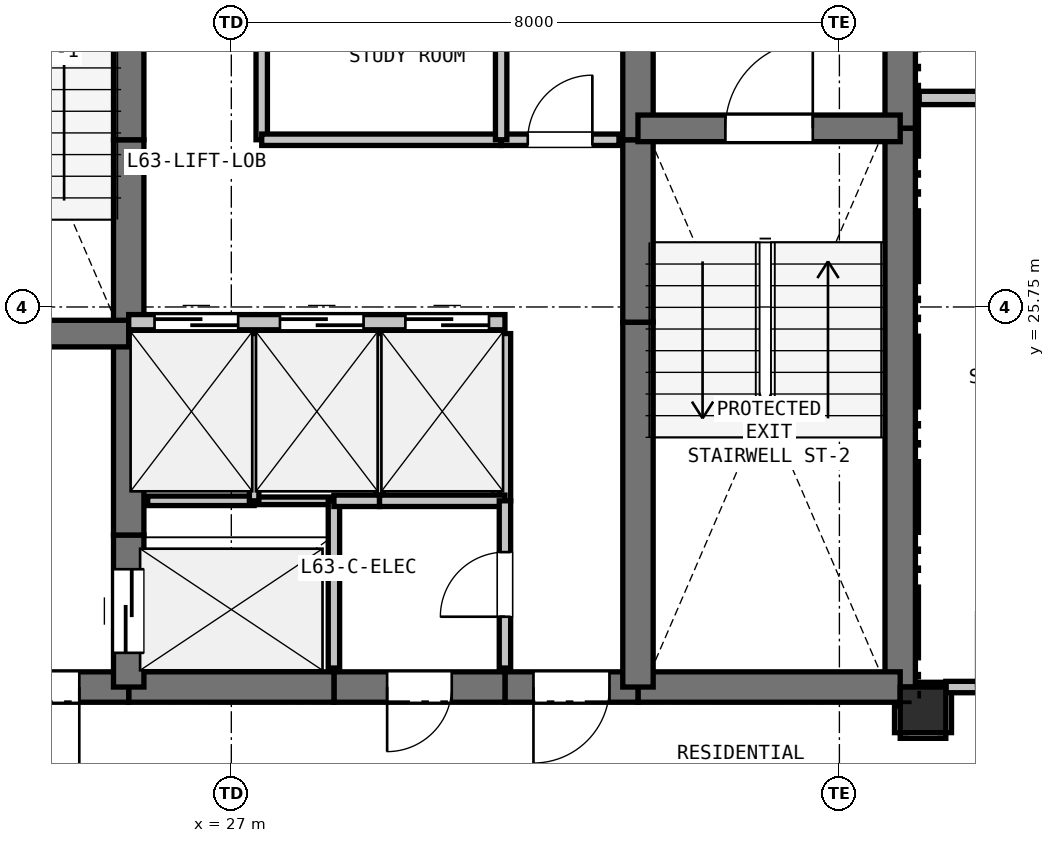
"""IFC4 building model, lengths in metres.
Left out: names, types, materials, properties, quantities, classifications, styles, units other than length and angle.
Written with IfcOpenShell. Run it as: python <this file> out.ifc"""

import sys

from ifc_helpers import new_model, si_unit, direction, frame, frame_2d, origin, origin_2d, place, context, subcontext, project, spatial, rectangle, extrude, element, fill, save


model = new_model("IFC4")
c1 = context("Model", 3, precision=1e-05, world=origin(), true_north=direction((0.0, 1.0)))
c2 = subcontext(c1, "Body", "Model", "MODEL_VIEW")
j1 = project(units=[si_unit("LENGTHUNIT", "METRE"), si_unit("PLANEANGLEUNIT", "RADIAN")], contexts=[c1])
p1 = place(None, origin())
s1 = spatial("IfcSite", under=j1, at=p1, CompositionType="ELEMENT")
p2 = place(p1, origin())
s2 = spatial("IfcBuilding", under=s1, at=p2, CompositionType="ELEMENT")
p3 = place(p2, frame((0.0, 0.0, 226.5)))
s3 = spatial("IfcBuildingStorey", under=s2, at=p3, CompositionType="ELEMENT", Elevation=226.5)
p4 = place(p3, frame((36.1, 20.45, 0.0), z_axis=(0.0, 0.0, 1.0), x_axis=(1.0, 0.0, 0.0)))
e1 = element("IfcColumn", 1, at=p4, inside=s3, PredefinedType="COLUMN", context=c2, shape_type="SweptSolid", body=[
    extrude(rectangle(XDim=0.6, YDim=0.6, at=origin_2d()), origin(), (0.0, 0.0, 1.0), 3.3),
])
p5 = place(p3, frame((35.8, 32.75, 0.0), z_axis=(0.0, 0.0, 1.0), x_axis=(0.0, -1.0, 0.0)))
e2 = element("IfcWall", 2, at=p5, inside=s3, PredefinedType="SHEAR", context=c2, shape_type="SweptSolid", body=[
    extrude(rectangle(XDim=4.65, YDim=0.4, at=frame_2d((2.325, 0.0))), origin(), (0.0, 0.0, 1.0), 3.08),
])
p6 = place(p3, frame((35.8, 28.1, 0.0), z_axis=(0.0, 0.0, 1.0), x_axis=(0.0, -1.0, 0.0)))
e3 = element("IfcWall", 3, at=p6, inside=s3, PredefinedType="SHEAR", context=c2, shape_type="SweptSolid", body=[
    extrude(rectangle(XDim=7.35, YDim=0.4, at=frame_2d((3.675, 0.0))), origin(), (0.0, 0.0, 1.0), 3.08),
])
p7 = place(p3, frame((35.8, 20.75, 0.0), z_axis=(0.0, 0.0, 1.0), x_axis=(-1.0, 0.0, 0.0)))
e4 = element("IfcWall", 4, at=p7, inside=s3, PredefinedType="SHEAR", context=c2, shape_type="SweptSolid", body=[
    extrude(rectangle(XDim=3.45, YDim=0.4, at=frame_2d((1.725, 0.0))), origin(), (0.0, 0.0, 1.0), 3.08),
])
p8 = place(p3, frame((32.35, 20.75, 0.0), z_axis=(0.0, 0.0, 1.0), x_axis=(-1.0, 0.0, 0.0)))
e5 = element("IfcWall", 5, at=p8, inside=s3, PredefinedType="SHEAR", context=c2, shape_type="SweptSolid", body=[
    extrude(rectangle(XDim=1.75, YDim=0.4, at=frame_2d((0.875, 0.0))), origin(), (0.0, 0.0, 1.0), 3.08),
])
p9 = place(p8, frame((0.375, 0.0, 0.0)))
e6 = element("IfcOpeningElement", 6, at=p9, cuts=e5, PredefinedType="OPENING", context=c2, shape_type="SweptSolid", body=[
    extrude(rectangle(XDim=1.0, YDim=2.15, at=frame_2d((0.5, 1.075))), frame((0.0, 0.21, 0.0), z_axis=(0.0, -1.0, 0.0), x_axis=(1.0, 0.0, 0.0)), (0.0, 0.0, 1.0), 0.42),
])
p10 = place(p3, frame((30.6, 20.75, 0.0), z_axis=(0.0, 0.0, 1.0), x_axis=(-1.0, 0.0, 0.0)))
e7 = element("IfcWall", 7, at=p10, inside=s3, PredefinedType="SHEAR", context=c2, shape_type="SweptSolid", body=[
    extrude(rectangle(XDim=2.25, YDim=0.4, at=frame_2d((1.125, 0.0))), origin(), (0.0, 0.0, 1.0), 3.08),
])
p11 = place(p10, frame((0.7, 0.0, 0.0)))
e8 = element("IfcOpeningElement", 8, at=p11, cuts=e7, PredefinedType="OPENING", context=c2, shape_type="SweptSolid", body=[
    extrude(rectangle(XDim=0.85, YDim=2.1, at=frame_2d((0.425, 1.05))), frame((0.0, 0.21, 0.0), z_axis=(0.0, -1.0, 0.0), x_axis=(1.0, 0.0, 0.0)), (0.0, 0.0, 1.0), 0.42),
])
p12 = place(p3, frame((28.35, 20.75, 0.0), z_axis=(0.0, 0.0, 1.0), x_axis=(-1.0, 0.0, 0.0)))
e9 = element("IfcWall", 9, at=p12, inside=s3, PredefinedType="SHEAR", context=c2, shape_type="SweptSolid", body=[
    extrude(rectangle(XDim=2.7, YDim=0.4, at=frame_2d((1.35, 0.0))), origin(), (0.0, 0.0, 1.0), 3.08),
])
p13 = place(p3, frame((25.65, 20.75, 0.0), z_axis=(0.0, 0.0, 1.0), x_axis=(-1.0, 0.0, 0.0)))
e10 = element("IfcWall", 10, at=p13, inside=s3, PredefinedType="SHEAR", context=c2, shape_type="SweptSolid", body=[
    extrude(rectangle(XDim=3.45, YDim=0.4, at=frame_2d((1.725, 0.0))), origin(), (0.0, 0.0, 1.0), 3.08),
])
p14 = place(p13, frame((0.65, 0.0, 0.0)))
e11 = element("IfcOpeningElement", 11, at=p14, cuts=e10, PredefinedType="OPENING", context=c2, shape_type="SweptSolid", body=[
    extrude(rectangle(XDim=1.15, YDim=2.15, at=frame_2d((0.575, 1.075))), frame((0.0, 0.21, 0.0), z_axis=(0.0, -1.0, 0.0), x_axis=(1.0, 0.0, 0.0)), (0.0, 0.0, 1.0), 0.42),
])
p15 = place(p3, frame((25.65, 20.75, 0.0), z_axis=(0.0, 0.0, 1.0), x_axis=(0.0, 1.0, 0.0)))
e12 = element("IfcWall", 12, at=p15, inside=s3, PredefinedType="SHEAR", context=c2, shape_type="SweptSolid", body=[
    extrude(rectangle(XDim=2.0, YDim=0.4, at=frame_2d((1.0, 0.0))), origin(), (0.0, 0.0, 1.0), 3.08),
])
p16 = place(p15, frame((0.45, 0.0, 0.0)))
e13 = element("IfcOpeningElement", 13, at=p16, cuts=e12, PredefinedType="OPENING", context=c2, shape_type="SweptSolid", body=[
    extrude(rectangle(XDim=1.1, YDim=2.15, at=frame_2d((0.55, 1.075))), frame((0.0, 0.21, 0.0), z_axis=(0.0, -1.0, 0.0), x_axis=(1.0, 0.0, 0.0)), (0.0, 0.0, 1.0), 0.42),
])
p17 = place(p3, frame((25.65, 22.75, 0.0), z_axis=(0.0, 0.0, 1.0), x_axis=(0.0, 1.0, 0.0)))
e14 = element("IfcWall", 14, at=p17, inside=s3, PredefinedType="SHEAR", context=c2, shape_type="SweptSolid", body=[
    extrude(rectangle(XDim=2.8, YDim=0.4, at=frame_2d((1.4, 0.0))), origin(), (0.0, 0.0, 1.0), 3.08),
])
p18 = place(p3, frame((25.65, 25.55, 0.0), z_axis=(0.0, 0.0, 1.0), x_axis=(0.0, 1.0, 0.0)))
e15 = element("IfcWall", 15, at=p18, inside=s3, PredefinedType="SHEAR", context=c2, shape_type="SweptSolid", body=[
    extrude(rectangle(XDim=2.4, YDim=0.4, at=frame_2d((1.2, 0.0))), origin(), (0.0, 0.0, 1.0), 3.08),
])
for number, where, z_axis, x_axis in (
    (16, (25.65, 27.95, 0.0), (0.0, 0.0, 1.0), (0.0, 1.0, 0.0)),
    (17, (32.35, 20.75, 0.0), (0.0, 0.0, 1.0), (0.0, 1.0, 0.0)),
):
    element("IfcWall", number, at=place(p3, frame(where, z_axis=z_axis, x_axis=x_axis)), inside=s3, PredefinedType="SHEAR", context=c2, shape_type="SweptSolid", body=[
        extrude(rectangle(XDim=4.8, YDim=0.4, at=frame_2d((2.4, 0.0))), origin(), (0.0, 0.0, 1.0), 3.08),
    ])
p19 = place(p3, frame((32.35, 25.55, 0.0), z_axis=(0.0, 0.0, 1.0), x_axis=(0.0, 1.0, 0.0)))
e18 = element("IfcWall", 18, at=p19, inside=s3, PredefinedType="SHEAR", context=c2, shape_type="SweptSolid", body=[
    extrude(rectangle(XDim=2.4, YDim=0.4, at=frame_2d((1.2, 0.0))), origin(), (0.0, 0.0, 1.0), 3.08),
])
p20 = place(p3, frame((32.35, 27.95, 0.0), z_axis=(0.0, 0.0, 1.0), x_axis=(0.0, 1.0, 0.0)))
e19 = element("IfcWall", 19, at=p20, inside=s3, PredefinedType="SHEAR", context=c2, shape_type="SweptSolid", body=[
    extrude(rectangle(XDim=2.8, YDim=0.4, at=frame_2d((1.4, 0.0))), origin(), (0.0, 0.0, 1.0), 3.08),
])
p21 = place(p3, frame((22.2, 25.4, 0.0), z_axis=(0.0, 0.0, 1.0), x_axis=(1.0, 0.0, 0.0)))
e20 = element("IfcWall", 20, at=p21, inside=s3, PredefinedType="SHEAR", context=c2, shape_type="SweptSolid", body=[
    extrude(rectangle(XDim=3.45, YDim=0.35, at=frame_2d((1.725, 0.0))), origin(), (0.0, 0.0, 1.0), 3.08),
])
p22 = place(p21, frame((1.15, 0.0, 0.0)))
e21 = element("IfcOpeningElement", 21, at=p22, cuts=e20, PredefinedType="OPENING", context=c2, shape_type="SweptSolid", body=[
    extrude(rectangle(XDim=1.15, YDim=2.15, at=frame_2d((0.575, 1.075))), frame((0.0, 0.185, 0.0), z_axis=(0.0, -1.0, 0.0), x_axis=(1.0, 0.0, 0.0)), (0.0, 0.0, 1.0), 0.37),
])
p23 = place(p3, frame((32.35, 28.1, 0.0), z_axis=(0.0, 0.0, 1.0), x_axis=(1.0, 0.0, 0.0)))
e22 = element("IfcWall", 22, at=p23, inside=s3, PredefinedType="SHEAR", context=c2, shape_type="SweptSolid", body=[
    extrude(rectangle(XDim=3.45, YDim=0.35, at=frame_2d((1.725, 0.0))), origin(), (0.0, 0.0, 1.0), 3.08),
])
p24 = place(p23, frame((1.15, 0.0, 0.0)))
e23 = element("IfcOpeningElement", 23, at=p24, cuts=e22, PredefinedType="OPENING", context=c2, shape_type="SweptSolid", body=[
    extrude(rectangle(XDim=1.15, YDim=2.15, at=frame_2d((0.575, 1.075))), frame((0.0, 0.185, 0.0), z_axis=(0.0, -1.0, 0.0), x_axis=(1.0, 0.0, 0.0)), (0.0, 0.0, 1.0), 0.37),
])
p25 = place(p3, frame((25.65, 25.55, 0.0), z_axis=(0.0, 0.0, 1.0), x_axis=(1.0, 0.0, 0.0)))
e24 = element("IfcWall", 24, at=p25, inside=s3, PredefinedType="PARTITIONING", context=c2, shape_type="SweptSolid", body=[
    extrude(rectangle(XDim=4.95, YDim=0.2, at=frame_2d((2.475, 0.0))), origin(), (0.0, 0.0, 1.0), 3.08),
])
p26 = place(p25, frame((0.34, 0.0, 0.0)))
e25 = element("IfcOpeningElement", 25, at=p26, cuts=e24, PredefinedType="OPENING", context=c2, shape_type="SweptSolid", body=[
    extrude(rectangle(XDim=1.1, YDim=2.15, at=frame_2d((0.55, 1.075))), frame((0.0, 0.11, 0.0), z_axis=(0.0, -1.0, 0.0), x_axis=(1.0, 0.0, 0.0)), (0.0, 0.0, 1.0), 0.22),
])
p27 = place(p25, frame((1.99, 0.0, 0.0)))
e26 = element("IfcOpeningElement", 26, at=p27, cuts=e24, PredefinedType="OPENING", context=c2, shape_type="SweptSolid", body=[
    extrude(rectangle(XDim=1.1, YDim=2.15, at=frame_2d((0.55, 1.075))), frame((0.0, 0.11, 0.0), z_axis=(0.0, -1.0, 0.0), x_axis=(1.0, 0.0, 0.0)), (0.0, 0.0, 1.0), 0.22),
])
p28 = place(p25, frame((3.64, 0.0, 0.0)))
e27 = element("IfcOpeningElement", 27, at=p28, cuts=e24, PredefinedType="OPENING", context=c2, shape_type="SweptSolid", body=[
    extrude(rectangle(XDim=1.1, YDim=2.15, at=frame_2d((0.55, 1.075))), frame((0.0, 0.11, 0.0), z_axis=(0.0, -1.0, 0.0), x_axis=(1.0, 0.0, 0.0)), (0.0, 0.0, 1.0), 0.22),
])
p29 = place(p3, frame((25.9, 23.2, 0.0), z_axis=(0.0, 0.0, 1.0), x_axis=(1.0, 0.0, 0.0)))
e28 = element("IfcWall", 28, at=p29, inside=s3, PredefinedType="PARTITIONING", context=c2, shape_type="SweptSolid", body=[
    extrude(rectangle(XDim=1.4, YDim=0.125, at=frame_2d((0.7, 0.0))), origin(), (0.0, 0.0, 1.0), 3.08),
])
p30 = place(p3, frame((27.3, 23.2, 0.0), z_axis=(0.0, 0.0, 1.0), x_axis=(1.0, 0.0, 0.0)))
e29 = element("IfcWall", 29, at=p30, inside=s3, PredefinedType="PARTITIONING", context=c2, shape_type="SweptSolid", body=[
    extrude(rectangle(XDim=1.05, YDim=0.1, at=frame_2d((0.525, 0.0))), origin(), (0.0, 0.0, 1.0), 3.08),
])
p31 = place(p3, frame((28.35, 23.2, 0.0), z_axis=(0.0, 0.0, 1.0), x_axis=(0.0, -1.0, 0.0)))
e30 = element("IfcWall", 30, at=p31, inside=s3, PredefinedType="PARTITIONING", context=c2, shape_type="SweptSolid", body=[
    extrude(rectangle(XDim=2.2, YDim=0.15, at=frame_2d((1.1, 0.0))), origin(), (0.0, 0.0, 1.0), 3.08),
])
p32 = place(p3, frame((27.3, 25.4, 0.0), z_axis=(0.0, 0.0, 1.0), x_axis=(0.0, -1.0, 0.0)))
e31 = element("IfcWall", 31, at=p32, inside=s3, PredefinedType="PARTITIONING", context=c2, shape_type="SweptSolid", body=[
    extrude(rectangle(XDim=2.2, YDim=0.125, at=frame_2d((1.1, 0.0))), origin(), (0.0, 0.0, 1.0), 3.08),
])
p33 = place(p3, frame((28.95, 25.4, 0.0), z_axis=(0.0, 0.0, 1.0), x_axis=(0.0, -1.0, 0.0)))
e32 = element("IfcWall", 32, at=p33, inside=s3, PredefinedType="PARTITIONING", context=c2, shape_type="SweptSolid", body=[
    extrude(rectangle(XDim=2.2, YDim=0.1, at=frame_2d((1.1, 0.0))), origin(), (0.0, 0.0, 1.0), 3.08),
])
p34 = place(p3, frame((28.95, 23.2, 0.0), z_axis=(0.0, 0.0, 1.0), x_axis=(-1.0, 0.0, 0.0)))
e33 = element("IfcWall", 33, at=p34, inside=s3, PredefinedType="PARTITIONING", context=c2, shape_type="SweptSolid", body=[
    extrude(rectangle(XDim=0.6, YDim=0.15, at=frame_2d((0.3, 0.0))), origin(), (0.0, 0.0, 1.0), 3.08),
])
p35 = place(p3, frame((30.6, 25.4, 0.0), z_axis=(0.0, 0.0, 1.0), x_axis=(0.0, -1.0, 0.0)))
e34 = element("IfcWall", 34, at=p35, inside=s3, PredefinedType="PARTITIONING", context=c2, shape_type="SweptSolid", body=[
    extrude(rectangle(XDim=2.2, YDim=0.15, at=frame_2d((1.1, 0.0))), origin(), (0.0, 0.0, 1.0), 3.08),
])
p36 = place(p3, frame((30.6, 23.2, 0.0), z_axis=(0.0, 0.0, 1.0), x_axis=(-1.0, 0.0, 0.0)))
e35 = element("IfcWall", 35, at=p36, inside=s3, PredefinedType="PARTITIONING", context=c2, shape_type="SweptSolid", body=[
    extrude(rectangle(XDim=1.65, YDim=0.15, at=frame_2d((0.825, 0.0))), origin(), (0.0, 0.0, 1.0), 3.08),
])
p37 = place(p3, frame((30.6, 21.0, 0.0), z_axis=(0.0, 0.0, 1.0), x_axis=(0.0, 1.0, 0.0)))
e36 = element("IfcWall", 36, at=p37, inside=s3, PredefinedType="PARTITIONING", context=c2, shape_type="SweptSolid", body=[
    extrude(rectangle(XDim=2.2, YDim=0.15, at=frame_2d((1.1, 0.0))), origin(), (0.0, 0.0, 1.0), 3.08),
])
p38 = place(p37, frame((0.675, 0.0, 0.0)))
e37 = element("IfcOpeningElement", 37, at=p38, cuts=e36, PredefinedType="OPENING", context=c2, shape_type="SweptSolid", body=[
    extrude(rectangle(XDim=0.85, YDim=2.1, at=frame_2d((0.425, 1.05))), frame((0.0, 0.085, 0.0), z_axis=(0.0, -1.0, 0.0), x_axis=(1.0, 0.0, 0.0)), (0.0, 0.0, 1.0), 0.17),
])
p39 = place(p3, frame((27.4, 32.5, 0.0), z_axis=(0.0, 0.0, 1.0), x_axis=(0.0, -1.0, 0.0)))
e38 = element("IfcWall", 38, at=p39, inside=s3, PredefinedType="PARTITIONING", context=c2, shape_type="SweptSolid", body=[
    extrude(rectangle(XDim=4.55, YDim=0.15, at=frame_2d((2.275, 0.0))), origin(), (0.0, 0.0, 1.0), 3.08),
])
p40 = place(p39, frame((1.775, 0.0, 0.0)))
e39 = element("IfcOpeningElement", 39, at=p40, cuts=e38, PredefinedType="OPENING", context=c2, shape_type="SweptSolid", body=[
    extrude(rectangle(XDim=1.0, YDim=2.15, at=frame_2d((0.5, 1.075))), frame((0.0, 0.085, 0.0), z_axis=(0.0, -1.0, 0.0), x_axis=(1.0, 0.0, 0.0)), (0.0, 0.0, 1.0), 0.17),
])
p41 = place(p3, frame((27.4, 27.95, 0.0), z_axis=(0.0, 0.0, 1.0), x_axis=(1.0, 0.0, 0.0)))
e40 = element("IfcWall", 40, at=p41, inside=s3, PredefinedType="PARTITIONING", context=c2, shape_type="SweptSolid", body=[
    extrude(rectangle(XDim=3.15, YDim=0.15, at=frame_2d((1.575, 0.0))), origin(), (0.0, 0.0, 1.0), 3.08),
])
p42 = place(p3, frame((30.55, 27.95, 0.0), z_axis=(0.0, 0.0, 1.0), x_axis=(1.0, 0.0, 0.0)))
e41 = element("IfcWall", 41, at=p42, inside=s3, PredefinedType="PARTITIONING", context=c2, shape_type="SweptSolid", body=[
    extrude(rectangle(XDim=1.55, YDim=0.15, at=frame_2d((0.775, 0.0))), origin(), (0.0, 0.0, 1.0), 3.08),
])
p43 = place(p42, frame((0.35, 0.0, 0.0)))
e42 = element("IfcOpeningElement", 42, at=p43, cuts=e41, PredefinedType="OPENING", context=c2, shape_type="SweptSolid", body=[
    extrude(rectangle(XDim=0.85, YDim=2.1, at=frame_2d((0.425, 1.05))), frame((0.0, 0.085, 0.0), z_axis=(0.0, -1.0, 0.0), x_axis=(1.0, 0.0, 0.0)), (0.0, 0.0, 1.0), 0.17),
])
p44 = place(p3, frame((35.8, 20.15, 0.0), z_axis=(0.0, 0.0, 1.0), x_axis=(1.0, 0.0, 0.0)))
e43 = element("IfcWall", 43, at=p44, inside=s3, PredefinedType="PARTITIONING", context=c2, shape_type="SweptSolid", body=[
    extrude(rectangle(XDim=0.6, YDim=0.15, at=frame_2d((0.3, 0.0))), origin(), (0.0, 0.0, 1.0), 2.528),
])
p45 = place(p3, frame((36.4, 20.15, 0.0), z_axis=(0.0, 0.0, 1.0), x_axis=(0.0, 1.0, 0.0)))
e44 = element("IfcWall", 44, at=p45, inside=s3, PredefinedType="PARTITIONING", context=c2, shape_type="SweptSolid", body=[
    extrude(rectangle(XDim=0.6, YDim=0.15, at=frame_2d((0.3, 0.0))), origin(), (0.0, 0.0, 1.0), 3.08),
])
p46 = place(p3, frame((36.4, 20.75, 0.0), z_axis=(0.0, 0.0, 1.0), x_axis=(1.0, 0.0, 0.0)))
e45 = element("IfcWall", 45, at=p46, inside=s3, PredefinedType="PARTITIONING", context=c2, shape_type="SweptSolid", body=[
    extrude(rectangle(XDim=1.8, YDim=0.15, at=frame_2d((0.9, 0.0))), origin(), (0.0, 0.0, 1.0), 3.08),
])
p47 = place(p46, frame((0.4, 0.0, 0.0)))
e46 = element("IfcOpeningElement", 46, at=p47, cuts=e45, PredefinedType="OPENING", context=c2, shape_type="SweptSolid", body=[
    extrude(rectangle(XDim=1.0, YDim=2.15, at=frame_2d((0.5, 1.075))), frame((0.0, 0.085, 0.0), z_axis=(0.0, -1.0, 0.0), x_axis=(1.0, 0.0, 0.0)), (0.0, 0.0, 1.0), 0.17),
])
p48 = place(p3, frame((35.8, 20.5, 0.0), z_axis=(0.0, 0.0, 1.0), x_axis=(0.0, -1.0, 0.0)))
e47 = element("IfcWall", 47, at=p48, inside=s3, PredefinedType="PARTITIONING", context=c2, shape_type="SweptSolid", body=[
    extrude(rectangle(XDim=0.35, YDim=0.15, at=frame_2d((0.175, 0.0))), origin(), (0.0, 0.0, 1.0), 2.605),
])
p49 = place(p3, frame((39.703, 28.5, 0.0), z_axis=(0.0, 0.0, 1.0), x_axis=(-1.0, 0.0, 0.0)))
e48 = element("IfcWall", 48, at=p49, inside=s3, PredefinedType="PLUMBINGWALL", context=c2, shape_type="SweptSolid", body=[
    extrude(rectangle(XDim=3.653, YDim=0.175, at=frame_2d((1.826, 0.0))), origin(), (0.0, 0.0, 1.0), 2.365),
])
p50 = place(p3, frame((30.55, 30.3, 0.0), z_axis=(0.0, 0.0, 1.0), x_axis=(0.0, -1.0, 0.0)))
e49 = element("IfcWall", 49, at=p50, inside=s3, PredefinedType="PARTITIONING", context=c2, shape_type="SweptSolid", body=[
    extrude(rectangle(XDim=2.35, YDim=0.15, at=frame_2d((1.175, 0.0))), origin(), (0.0, 0.0, 1.0), 3.08),
])
p51 = place(p3, frame((36.4, 20.75, 0.0), z_axis=(0.0, 0.0, 1.0), x_axis=(-1.0, 0.0, 0.0)))
e50 = element("IfcWall", 50, at=p51, inside=s3, PredefinedType="PARTITIONING", context=c2, shape_type="SweptSolid", body=[
    extrude(rectangle(XDim=0.35, YDim=0.125, at=frame_2d((0.175, 0.0))), origin(), (0.0, 0.0, 1.0), 2.605),
])
p52 = place(p26, origin())
e51 = element("IfcDoor", 51, at=p52, inside=s3, OperationType="SLIDING_TO_LEFT", PredefinedType="DOOR", context=c2, shape_type="SweptSolid", body=[
    extrude(rectangle(XDim=1.1, YDim=2.15, at=frame_2d((0.55, 1.075))), frame((0.0, 0.025, 0.0), z_axis=(0.0, -1.0, 0.0), x_axis=(1.0, 0.0, 0.0)), (0.0, 0.0, 1.0), 0.05),
])
fill(e25, e51)
p53 = place(p27, origin())
e52 = element("IfcDoor", 52, at=p53, inside=s3, OperationType="SLIDING_TO_LEFT", PredefinedType="DOOR", context=c2, shape_type="SweptSolid", body=[
    extrude(rectangle(XDim=1.1, YDim=2.15, at=frame_2d((0.55, 1.075))), frame((0.0, 0.025, 0.0), z_axis=(0.0, -1.0, 0.0), x_axis=(1.0, 0.0, 0.0)), (0.0, 0.0, 1.0), 0.05),
])
fill(e26, e52)
p54 = place(p28, origin())
e53 = element("IfcDoor", 53, at=p54, inside=s3, OperationType="SLIDING_TO_LEFT", PredefinedType="DOOR", context=c2, shape_type="SweptSolid", body=[
    extrude(rectangle(XDim=1.1, YDim=2.15, at=frame_2d((0.55, 1.075))), frame((0.0, 0.025, 0.0), z_axis=(0.0, -1.0, 0.0), x_axis=(1.0, 0.0, 0.0)), (0.0, 0.0, 1.0), 0.05),
])
fill(e27, e53)
p55 = place(p9, origin())
e54 = element("IfcDoor", 54, at=p55, inside=s3, OperationType="SINGLE_SWING_RIGHT", PredefinedType="DOOR", context=c2, shape_type="SweptSolid", body=[
    extrude(rectangle(XDim=1.0, YDim=2.15, at=frame_2d((0.5, 1.075))), frame((0.0, 0.025, 0.0), z_axis=(0.0, -1.0, 0.0), x_axis=(1.0, 0.0, 0.0)), (0.0, 0.0, 1.0), 0.05),
])
fill(e6, e54)
p56 = place(p16, origin())
e55 = element("IfcDoor", 55, at=p56, inside=s3, OperationType="SLIDING_TO_LEFT", PredefinedType="DOOR", context=c2, shape_type="SweptSolid", body=[
    extrude(rectangle(XDim=1.1, YDim=2.15, at=frame_2d((0.55, 1.075))), frame((0.0, 0.025, 0.0), z_axis=(0.0, -1.0, 0.0), x_axis=(1.0, 0.0, 0.0)), (0.0, 0.0, 1.0), 0.05),
])
fill(e13, e55)
p57 = place(p24, origin())
e56 = element("IfcDoor", 56, at=p57, inside=s3, OperationType="SINGLE_SWING_RIGHT", PredefinedType="DOOR", context=c2, shape_type="SweptSolid", body=[
    extrude(rectangle(XDim=1.15, YDim=2.15, at=frame_2d((0.575, 1.075))), frame((0.0, 0.025, 0.0), z_axis=(0.0, -1.0, 0.0), x_axis=(1.0, 0.0, 0.0)), (0.0, 0.0, 1.0), 0.05),
])
fill(e23, e56)
p58 = place(p14, origin())
e57 = element("IfcDoor", 57, at=p58, inside=s3, OperationType="SINGLE_SWING_LEFT", PredefinedType="DOOR", context=c2, shape_type="SweptSolid", body=[
    extrude(rectangle(XDim=1.15, YDim=2.15, at=frame_2d((0.575, 1.075))), frame((0.0, 0.025, 0.0), z_axis=(0.0, -1.0, 0.0), x_axis=(1.0, 0.0, 0.0)), (0.0, 0.0, 1.0), 0.05),
])
fill(e11, e57)
p59 = place(p43, origin())
e58 = element("IfcDoor", 58, at=p59, inside=s3, OperationType="SINGLE_SWING_RIGHT", PredefinedType="DOOR", context=c2, shape_type="SweptSolid", body=[
    extrude(rectangle(XDim=0.85, YDim=2.1, at=frame_2d((0.425, 1.05))), frame((0.0, 0.025, 0.0), z_axis=(0.0, -1.0, 0.0), x_axis=(1.0, 0.0, 0.0)), (0.0, 0.0, 1.0), 0.05),
])
fill(e42, e58)
p60 = place(p38, origin())
e59 = element("IfcDoor", 59, at=p60, inside=s3, OperationType="SINGLE_SWING_LEFT", PredefinedType="DOOR", context=c2, shape_type="SweptSolid", body=[
    extrude(rectangle(XDim=0.85, YDim=2.1, at=frame_2d((0.425, 1.05))), frame((0.0, 0.025, 0.0), z_axis=(0.0, -1.0, 0.0), x_axis=(1.0, 0.0, 0.0)), (0.0, 0.0, 1.0), 0.05),
])
fill(e37, e59)
p61 = place(p11, origin())
e60 = element("IfcDoor", 60, at=p61, inside=s3, OperationType="SINGLE_SWING_RIGHT", PredefinedType="DOOR", context=c2, shape_type="SweptSolid", body=[
    extrude(rectangle(XDim=0.85, YDim=2.1, at=frame_2d((0.425, 1.05))), frame((0.0, 0.025, 0.0), z_axis=(0.0, -1.0, 0.0), x_axis=(1.0, 0.0, 0.0)), (0.0, 0.0, 1.0), 0.05),
])
fill(e8, e60)
p62 = place(p47, origin())
e61 = element("IfcDoor", 61, at=p62, inside=s3, OperationType="SINGLE_SWING_LEFT", PredefinedType="DOOR", context=c2, shape_type="SweptSolid", body=[
    extrude(rectangle(XDim=1.0, YDim=2.15, at=frame_2d((0.5, 1.075))), frame((0.0, 0.025, 0.0), z_axis=(0.0, -1.0, 0.0), x_axis=(1.0, 0.0, 0.0)), (0.0, 0.0, 1.0), 0.05),
])
fill(e46, e61)
save(model, sys.argv[1])
